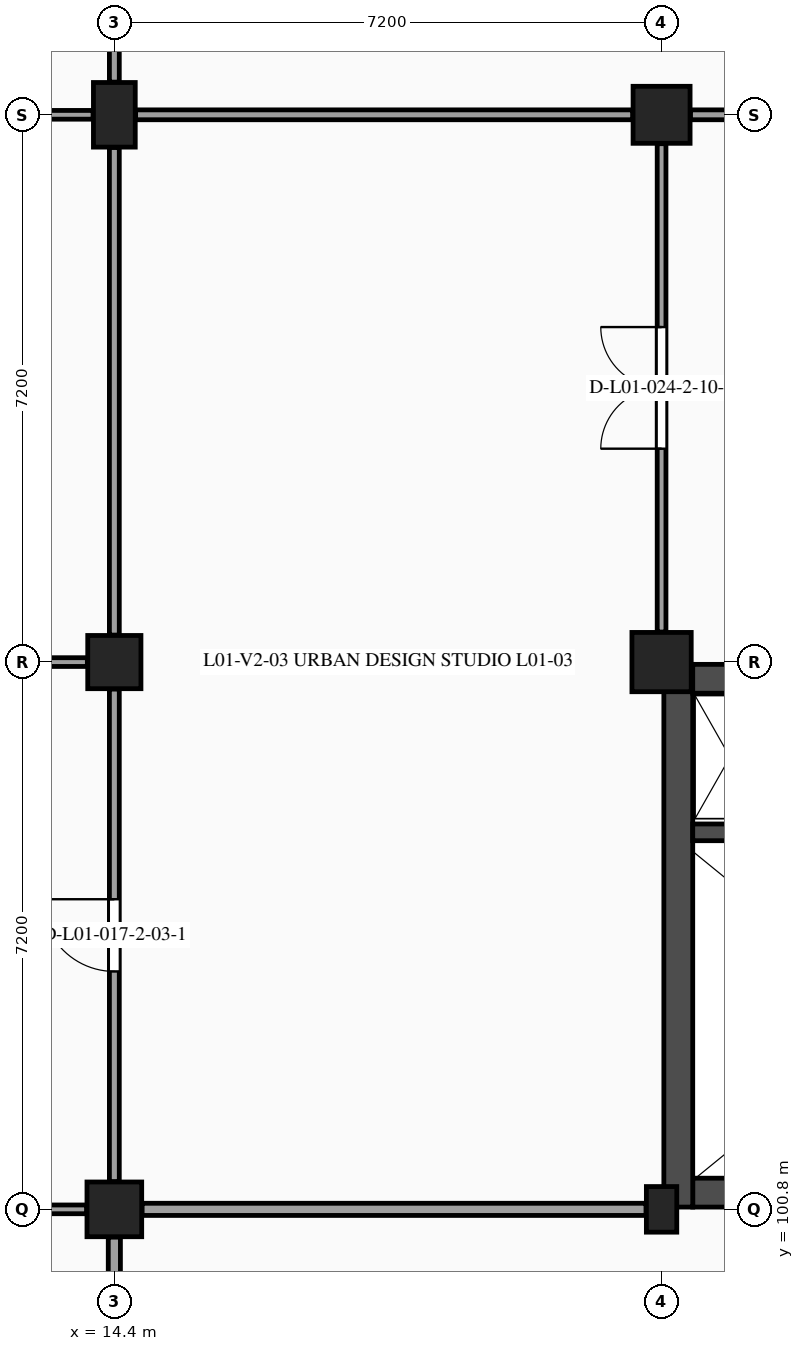
"""IFC4 building model, lengths in metres.
Left out: names, types, materials, properties, quantities, classifications, styles, units other than length and angle.
Written with IfcOpenShell. Run it as: python <this file> out.ifc"""

import sys

from ifc_helpers import new_model, si_unit, direction, frame, frame_2d, origin, origin_2d, place, context, subcontext, project, spatial, rectangle, extrude, element, fill, save


model = new_model("IFC4")
c1 = context("Model", 3, precision=1e-05, world=origin(), true_north=direction((0.0, 1.0)))
c2 = subcontext(c1, "Body", "Model", "MODEL_VIEW")
j1 = project(units=[si_unit("LENGTHUNIT", "METRE"), si_unit("PLANEANGLEUNIT", "RADIAN")], contexts=[c1])
p1 = place(None, origin())
s1 = spatial("IfcSite", under=j1, at=p1, CompositionType="ELEMENT")
p2 = place(p1, origin())
s2 = spatial("IfcBuilding", under=s1, at=p2, CompositionType="ELEMENT")
p3 = place(p2, frame((0.0, 0.0, 5.4)))
s3 = spatial("IfcBuildingStorey", under=s2, at=p3, CompositionType="ELEMENT", Elevation=5.4)
p4 = place(p3, frame((14.4, 100.8, 0.0), z_axis=(0.0, 0.0, 1.0), x_axis=(1.0, 0.0, 0.0)))
e1 = element("IfcColumn", 1, at=p4, inside=s3, PredefinedType="COLUMN", context=c2, shape_type="SweptSolid", body=[
    extrude(rectangle(XDim=0.72, YDim=0.72, at=origin_2d()), origin(), (0.0, 0.0, 1.0), 4.5),
])
p5 = place(p3, frame((14.4, 108.0, 0.0), z_axis=(0.0, 0.0, 1.0), x_axis=(1.0, 0.0, 0.0)))
e2 = element("IfcColumn", 2, at=p5, inside=s3, PredefinedType="COLUMN", context=c2, shape_type="SweptSolid", body=[
    extrude(rectangle(XDim=0.7, YDim=0.7, at=origin_2d()), origin(), (0.0, 0.0, 1.0), 4.5),
])
p6 = place(p3, frame((14.4, 115.2, 0.0), z_axis=(0.0, 0.0, 1.0), x_axis=(1.0, 0.0, 0.0)))
e3 = element("IfcColumn", 3, at=p6, inside=s3, PredefinedType="COLUMN", context=c2, shape_type="SweptSolid", body=[
    extrude(rectangle(XDim=0.55, YDim=0.85, at=origin_2d()), origin(), (0.0, 0.0, 1.0), 4.5),
])
p7 = place(p3, frame((21.6, 100.8, 0.0), z_axis=(0.0, 0.0, 1.0), x_axis=(1.0, 0.0, 0.0)))
e4 = element("IfcColumn", 4, at=p7, inside=s3, PredefinedType="PILASTER", context=c2, shape_type="SweptSolid", body=[
    extrude(rectangle(XDim=0.4, YDim=0.6, at=origin_2d()), origin(), (0.0, 0.0, 1.0), 4.5),
])
p8 = place(p3, frame((21.6, 108.0, 0.0), z_axis=(0.0, 0.0, 1.0), x_axis=(1.0, 0.0, 0.0)))
e5 = element("IfcColumn", 5, at=p8, inside=s3, PredefinedType="COLUMN", context=c2, shape_type="SweptSolid", body=[
    extrude(rectangle(XDim=0.78, YDim=0.78, at=origin_2d()), origin(), (0.0, 0.0, 1.0), 4.5),
])
p9 = place(p3, frame((21.6, 115.2, 0.0), z_axis=(0.0, 0.0, 1.0), x_axis=(1.0, 0.0, 0.0)))
e6 = element("IfcColumn", 6, at=p9, inside=s3, PredefinedType="COLUMN", context=c2, shape_type="SweptSolid", body=[
    extrude(rectangle(XDim=0.75, YDim=0.75, at=origin_2d()), origin(), (0.0, 0.0, 1.0), 4.5),
])
p10 = place(p3, frame((22.01, 101.02, 0.0), z_axis=(0.0, 0.0, 1.0), x_axis=(1.0, 0.0, 0.0)))
e7 = element("IfcWall", 7, at=p10, inside=s3, PredefinedType="SHEAR", context=c2, shape_type="SweptSolid", body=[
    extrude(rectangle(XDim=6.6, YDim=0.38, at=frame_2d((3.3, 0.0))), origin(), (0.0, 0.0, 1.0), 4.21),
])
p11 = place(p3, frame((21.82, 107.97, 0.0), z_axis=(0.0, 0.0, 1.0), x_axis=(0.0, -1.0, 0.0)))
e8 = element("IfcWall", 8, at=p11, inside=s3, PredefinedType="SHEAR", context=c2, shape_type="SweptSolid", body=[
    extrude(rectangle(XDim=7.14, YDim=0.38, at=frame_2d((3.57, 0.0))), origin(), (0.0, 0.0, 1.0), 4.21),
])
p12 = place(p3, frame((22.01, 107.78, 0.0), z_axis=(0.0, 0.0, 1.0), x_axis=(1.0, 0.0, 0.0)))
e9 = element("IfcWall", 9, at=p12, inside=s3, PredefinedType="SHEAR", context=c2, shape_type="SweptSolid", body=[
    extrude(rectangle(XDim=6.6, YDim=0.38, at=frame_2d((3.3, 0.0))), origin(), (0.0, 0.0, 1.0), 4.21),
])
p13 = place(p12, frame((1.42, 0.0, 0.0)))
e10 = element("IfcOpeningElement", 10, at=p13, cuts=e9, PredefinedType="OPENING", context=c2, shape_type="SweptSolid", body=[
    extrude(rectangle(XDim=0.85, YDim=2.1, at=frame_2d((0.425, 1.05))), frame((0.0, 0.2, 0.0), z_axis=(0.0, -1.0, 0.0), x_axis=(1.0, 0.0, 0.0)), (0.0, 0.0, 1.0), 0.4),
])
p14 = place(p12, frame((3.4, 0.0, 0.0)))
e11 = element("IfcOpeningElement", 11, at=p14, cuts=e9, PredefinedType="OPENING", context=c2, shape_type="SweptSolid", body=[
    extrude(rectangle(XDim=0.95, YDim=2.15, at=frame_2d((0.475, 1.075))), frame((0.0, 0.2, 0.0), z_axis=(0.0, -1.0, 0.0), x_axis=(1.0, 0.0, 0.0)), (0.0, 0.0, 1.0), 0.4),
])
p15 = place(p3, frame((22.01, 105.76, 0.0), z_axis=(0.0, 0.0, 1.0), x_axis=(1.0, 0.0, 0.0)))
e12 = element("IfcWall", 12, at=p15, inside=s3, PredefinedType="SHEAR", context=c2, shape_type="SweptSolid", body=[
    extrude(rectangle(XDim=6.6, YDim=0.22, at=frame_2d((3.3, 0.0))), origin(), (0.0, 0.0, 1.0), 4.21),
])
p16 = place(p3, frame((14.4, 93.98, 0.0), z_axis=(0.0, 0.0, 1.0), x_axis=(0.0, 1.0, 0.0)))
e13 = element("IfcWall", 13, at=p16, inside=s3, PredefinedType="PARTITIONING", context=c2, shape_type="SweptSolid", body=[
    extrude(rectangle(XDim=6.455, YDim=0.16, at=frame_2d((3.228, 0.0))), origin(), (0.0, 0.0, 1.0), 3.575),
])
p17 = place(p16, frame((2.587, 0.0, 0.0)))
e14 = element("IfcOpeningElement", 14, at=p17, cuts=e13, PredefinedType="OPENING", context=c2, shape_type="SweptSolid", body=[
    extrude(rectangle(XDim=1.28, YDim=2.24, at=frame_2d((0.64, 1.12))), frame((0.0, 0.09, 0.0), z_axis=(0.0, -1.0, 0.0), x_axis=(1.0, 0.0, 0.0)), (0.0, 0.0, 1.0), 0.18),
])
p18 = place(p3, frame((7.405, 100.8, 0.0), z_axis=(0.0, 0.0, 1.0), x_axis=(1.0, 0.0, 0.0)))
e15 = element("IfcWall", 15, at=p18, inside=s3, PredefinedType="PARTITIONING", context=c2, shape_type="SweptSolid", body=[
    extrude(rectangle(XDim=6.63, YDim=0.115, at=frame_2d((3.315, 0.0))), origin(), (0.0, 0.0, 1.0), 3.47),
])
p19 = place(p3, frame((14.4, 101.165, 0.0), z_axis=(0.0, 0.0, 1.0), x_axis=(0.0, 1.0, 0.0)))
e16 = element("IfcWall", 16, at=p19, inside=s3, PredefinedType="PARTITIONING", context=c2, shape_type="SweptSolid", body=[
    extrude(rectangle(XDim=6.48, YDim=0.13, at=frame_2d((3.24, 0.0))), origin(), (0.0, 0.0, 1.0), 3.525),
])
p20 = place(p19, frame((2.765, 0.0, 0.0)))
e17 = element("IfcOpeningElement", 17, at=p20, cuts=e16, PredefinedType="OPENING", context=c2, shape_type="SweptSolid", body=[
    extrude(rectangle(XDim=0.95, YDim=2.15, at=frame_2d((0.475, 1.075))), frame((0.0, 0.075, 0.0), z_axis=(0.0, -1.0, 0.0), x_axis=(1.0, 0.0, 0.0)), (0.0, 0.0, 1.0), 0.15),
])
p21 = place(p3, frame((7.595, 108.0, 0.0), z_axis=(0.0, 0.0, 1.0), x_axis=(1.0, 0.0, 0.0)))
e18 = element("IfcWall", 18, at=p21, inside=s3, PredefinedType="PARTITIONING", context=c2, shape_type="SweptSolid", body=[
    extrude(rectangle(XDim=6.45, YDim=0.115, at=frame_2d((3.225, 0.0))), origin(), (0.0, 0.0, 1.0), 3.47),
])
p22 = place(p3, frame((14.4, 108.355, 0.0), z_axis=(0.0, 0.0, 1.0), x_axis=(0.0, 1.0, 0.0)))
e19 = element("IfcWall", 19, at=p22, inside=s3, PredefinedType="PARTITIONING", context=c2, shape_type="SweptSolid", body=[
    extrude(rectangle(XDim=6.415, YDim=0.13, at=frame_2d((3.208, 0.0))), origin(), (0.0, 0.0, 1.0), 3.525),
])
p23 = place(p3, frame((7.58, 115.2, 0.0), z_axis=(0.0, 0.0, 1.0), x_axis=(1.0, 0.0, 0.0)))
e20 = element("IfcWall", 20, at=p23, inside=s3, PredefinedType="PARTITIONING", context=c2, shape_type="SweptSolid", body=[
    extrude(rectangle(XDim=6.54, YDim=0.115, at=frame_2d((3.27, 0.0))), origin(), (0.0, 0.0, 1.0), 3.47),
])
p24 = place(p3, frame((14.4, 115.63, 0.0), z_axis=(0.0, 0.0, 1.0), x_axis=(0.0, 1.0, 0.0)))
e21 = element("IfcWall", 21, at=p24, inside=s3, PredefinedType="PARTITIONING", context=c2, shape_type="SweptSolid", body=[
    extrude(rectangle(XDim=6.465, YDim=0.13, at=frame_2d((3.232, 0.0))), origin(), (0.0, 0.0, 1.0), 3.52),
])
p25 = place(p24, frame((2.433, 0.0, 0.0)))
e22 = element("IfcOpeningElement", 22, at=p25, cuts=e21, PredefinedType="OPENING", context=c2, shape_type="SweptSolid", body=[
    extrude(rectangle(XDim=1.6, YDim=2.2, at=frame_2d((0.8, 1.1))), frame((0.0, 0.075, 0.0), z_axis=(0.0, -1.0, 0.0), x_axis=(1.0, 0.0, 0.0)), (0.0, 0.0, 1.0), 0.15),
])
p26 = place(p3, frame((14.765, 100.8, 0.0), z_axis=(0.0, 0.0, 1.0), x_axis=(1.0, 0.0, 0.0)))
e23 = element("IfcWall", 23, at=p26, inside=s3, PredefinedType="PARTITIONING", context=c2, shape_type="SweptSolid", body=[
    extrude(rectangle(XDim=6.63, YDim=0.16, at=frame_2d((3.315, 0.0))), origin(), (0.0, 0.0, 1.0), 3.485),
])
p27 = place(p3, frame((21.6, 108.395, 0.0), z_axis=(0.0, 0.0, 1.0), x_axis=(0.0, 1.0, 0.0)))
e24 = element("IfcWall", 24, at=p27, inside=s3, PredefinedType="PARTITIONING", context=c2, shape_type="SweptSolid", body=[
    extrude(rectangle(XDim=6.425, YDim=0.115, at=frame_2d((3.212, 0.0))), origin(), (0.0, 0.0, 1.0), 3.525),
])
p28 = place(p27, frame((2.413, 0.0, 0.0)))
e25 = element("IfcOpeningElement", 25, at=p28, cuts=e24, PredefinedType="OPENING", context=c2, shape_type="SweptSolid", body=[
    extrude(rectangle(XDim=1.6, YDim=2.2, at=frame_2d((0.8, 1.1))), frame((0.0, 0.067, 0.0), z_axis=(0.0, -1.0, 0.0), x_axis=(1.0, 0.0, 0.0)), (0.0, 0.0, 1.0), 0.135),
])
p29 = place(p3, frame((14.68, 115.2, 0.0), z_axis=(0.0, 0.0, 1.0), x_axis=(1.0, 0.0, 0.0)))
e26 = element("IfcWall", 26, at=p29, inside=s3, PredefinedType="PARTITIONING", context=c2, shape_type="SweptSolid", body=[
    extrude(rectangle(XDim=6.54, YDim=0.13, at=frame_2d((3.27, 0.0))), origin(), (0.0, 0.0, 1.0), 3.485),
])
p30 = place(p3, frame((21.98, 115.2, 0.0), z_axis=(0.0, 0.0, 1.0), x_axis=(1.0, 0.0, 0.0)))
e27 = element("IfcWall", 27, at=p30, inside=s3, PredefinedType="PARTITIONING", context=c2, shape_type="SweptSolid", body=[
    extrude(rectangle(XDim=6.54, YDim=0.13, at=frame_2d((3.27, 0.0))), origin(), (0.0, 0.0, 1.0), 3.49),
])
p31 = place(p20, origin())
e28 = element("IfcDoor", 28, at=p31, inside=s3, OperationType="SINGLE_SWING_RIGHT", PredefinedType="DOOR", context=c2, shape_type="SweptSolid", body=[
    extrude(rectangle(XDim=0.95, YDim=2.15, at=frame_2d((0.475, 1.075))), frame((0.0, 0.025, 0.0), z_axis=(0.0, -1.0, 0.0), x_axis=(1.0, 0.0, 0.0)), (0.0, 0.0, 1.0), 0.05),
])
fill(e17, e28)
p32 = place(p28, origin())
e29 = element("IfcDoor", 29, at=p32, inside=s3, OperationType="DOUBLE_DOOR_SINGLE_SWING", PredefinedType="DOOR", context=c2, shape_type="SweptSolid", body=[
    extrude(rectangle(XDim=1.6, YDim=2.2, at=frame_2d((0.8, 1.1))), frame((0.0, 0.025, 0.0), z_axis=(0.0, -1.0, 0.0), x_axis=(1.0, 0.0, 0.0)), (0.0, 0.0, 1.0), 0.05),
])
fill(e25, e29)
save(model, sys.argv[1])
